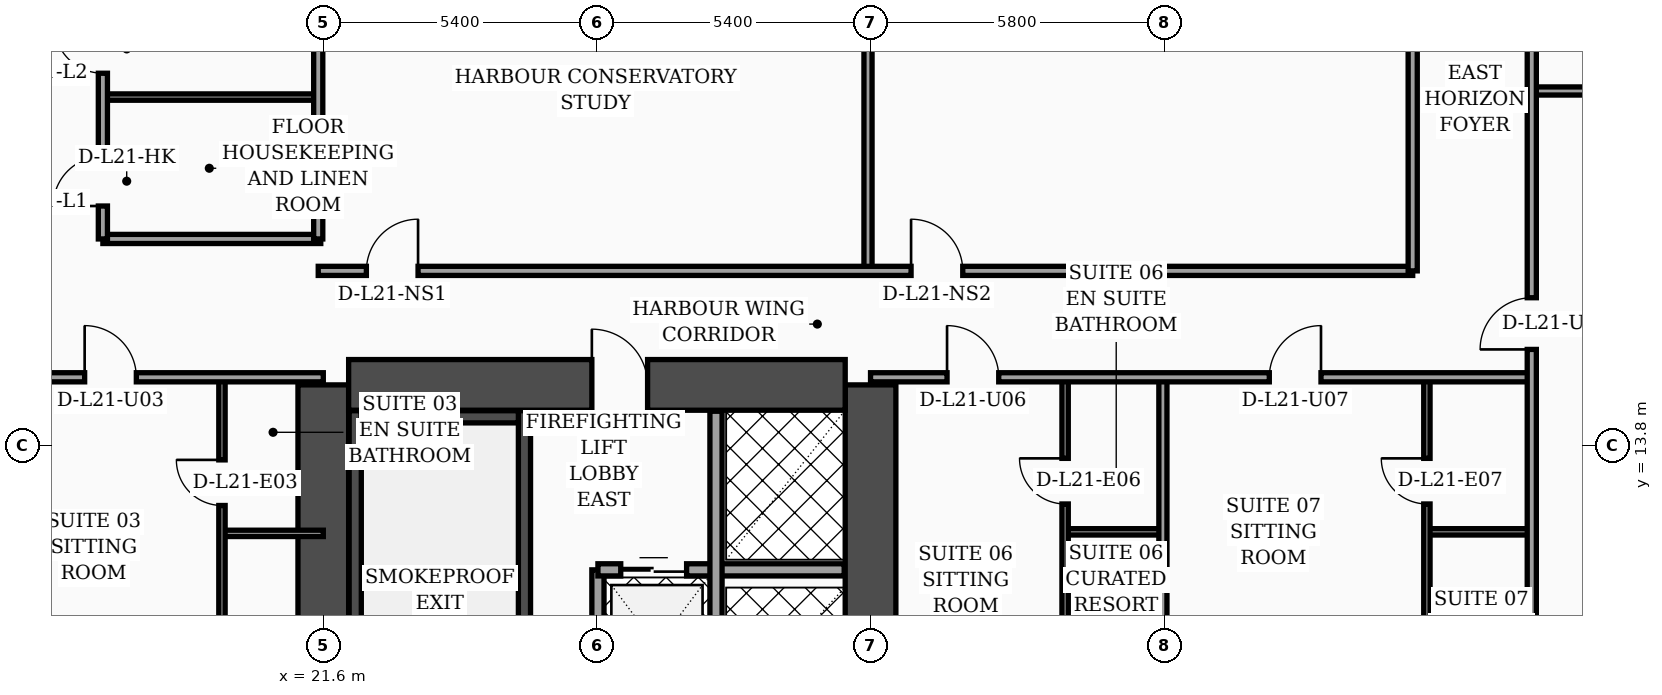
"""IFC4 building model, lengths in metres.
Left out: names, types, materials, properties, quantities, classifications, styles, units other than length and angle.
Written with IfcOpenShell. Run it as: python <this file> out.ifc"""

import sys

from ifc_helpers import new_model, si_unit, direction, frame, frame_2d, origin, place, context, subcontext, project, spatial, rectangle, extrude, element, fill, save


model = new_model("IFC4")
c1 = context("Model", 3, precision=1e-05, world=origin(), true_north=direction((0.0, 1.0)))
c2 = subcontext(c1, "Body", "Model", "MODEL_VIEW")
j1 = project(units=[si_unit("LENGTHUNIT", "METRE"), si_unit("PLANEANGLEUNIT", "RADIAN")], contexts=[c1])
p1 = place(None, origin())
s1 = spatial("IfcSite", under=j1, at=p1, CompositionType="ELEMENT")
p2 = place(p1, origin())
s2 = spatial("IfcBuilding", under=s1, at=p2, CompositionType="ELEMENT")
p3 = place(p2, frame((0.0, 0.0, 88.8)))
s3 = spatial("IfcBuildingStorey", under=s2, at=p3, CompositionType="ELEMENT", Elevation=88.8)
for number, where, z_axis, x_axis in (
    (1, (21.6, 4.6, 0.0), (0.0, 0.0, 1.0), (0.0, 1.0, 0.0)),
    (2, (32.4, 4.6, 0.0), (0.0, 0.0, 1.0), (0.0, 1.0, 0.0)),
):
    element("IfcWall", number, at=place(p3, frame(where, z_axis=z_axis, x_axis=x_axis)), inside=s3, PredefinedType="SHEAR", context=c2, shape_type="SweptSolid", body=[
        extrude(rectangle(XDim=10.4, YDim=1.0, at=frame_2d((5.2, 0.0))), origin(), (0.0, 0.0, 1.0), 3.52),
    ])
p4 = place(p3, frame((22.1, 15.0, 0.0), z_axis=(0.0, 0.0, 1.0), x_axis=(1.0, 0.0, 0.0)))
e3 = element("IfcWall", 3, at=p4, inside=s3, PredefinedType="SHEAR", context=c2, shape_type="SweptSolid", body=[
    extrude(rectangle(XDim=9.8, YDim=1.0, at=frame_2d((4.9, 0.0))), origin(), (0.0, 0.0, 1.0), 3.52),
])
p5 = place(p4, frame((4.8, 0.0, 0.0)))
e4 = element("IfcOpeningElement", 4, at=p5, cuts=e3, PredefinedType="OPENING", context=c2, shape_type="SweptSolid", body=[
    extrude(rectangle(XDim=1.1, YDim=2.2, at=frame_2d((0.55, 1.1))), frame((0.0, 0.51, 0.0), z_axis=(0.0, -1.0, 0.0), x_axis=(1.0, 0.0, 0.0)), (0.0, 0.0, 1.0), 1.02),
])
p6 = place(p3, frame((22.23, 5.1, 0.0), z_axis=(0.0, 0.0, 1.0), x_axis=(0.0, 1.0, 0.0)))
e5 = element("IfcWall", 5, at=p6, inside=s3, PredefinedType="SOLIDWALL", context=c2, shape_type="SweptSolid", body=[
    extrude(rectangle(XDim=9.39, YDim=0.24, at=frame_2d((4.695, 0.0))), origin(), (0.0, 0.0, 1.0), 3.52),
])
p7 = place(p3, frame((25.57, 5.1, 0.0), z_axis=(0.0, 0.0, 1.0), x_axis=(0.0, 1.0, 0.0)))
e6 = element("IfcWall", 6, at=p7, inside=s3, PredefinedType="SOLIDWALL", context=c2, shape_type="SweptSolid", body=[
    extrude(rectangle(XDim=9.39, YDim=0.24, at=frame_2d((4.695, 0.0))), origin(), (0.0, 0.0, 1.0), 3.52),
])
p8 = place(p7, frame((0.35, 0.0, 0.0)))
e7 = element("IfcOpeningElement", 7, at=p8, cuts=e6, PredefinedType="OPENING", context=c2, shape_type="SweptSolid", body=[
    extrude(rectangle(XDim=1.15, YDim=2.2, at=frame_2d((0.575, 1.1))), frame((0.0, 0.13, 0.0), z_axis=(0.0, -1.0, 0.0), x_axis=(1.0, 0.0, 0.0)), (0.0, 0.0, 1.0), 0.26),
])
p9 = place(p3, frame((22.35, 14.37, 0.0), z_axis=(0.0, 0.0, 1.0), x_axis=(1.0, 0.0, 0.0)))
e8 = element("IfcWall", 8, at=p9, inside=s3, PredefinedType="SOLIDWALL", context=c2, shape_type="SweptSolid", body=[
    extrude(rectangle(XDim=3.1, YDim=0.24, at=frame_2d((1.55, 0.0))), origin(), (0.0, 0.0, 1.0), 3.52),
])
p10 = place(p3, frame((27.02, 5.12, 0.0), z_axis=(0.0, 0.0, 1.0), x_axis=(0.0, 1.0, 0.0)))
e9 = element("IfcWall", 9, at=p10, inside=s3, PredefinedType="SOLIDWALL", context=c2, shape_type="SweptSolid", body=[
    extrude(rectangle(XDim=6.23, YDim=0.24, at=frame_2d((3.115, 0.0))), origin(), (0.0, 0.0, 1.0), 3.52),
])
p11 = place(p3, frame((27.02, 11.35, 0.0), z_axis=(0.0, 0.0, 1.0), x_axis=(1.0, 0.0, 0.0)))
e10 = element("IfcWall", 10, at=p11, inside=s3, PredefinedType="SOLIDWALL", context=c2, shape_type="SweptSolid", body=[
    extrude(rectangle(XDim=4.86, YDim=0.24, at=frame_2d((2.43, 0.0))), origin(), (0.0, 0.0, 1.0), 3.52),
])
p12 = place(p11, frame((0.45, 0.0, 0.0)))
e11 = element("IfcOpeningElement", 11, at=p12, cuts=e10, PredefinedType="OPENING", context=c2, shape_type="SweptSolid", body=[
    extrude(rectangle(XDim=1.3, YDim=2.35, at=frame_2d((0.65, 1.175))), frame((0.0, 0.13, 0.0), z_axis=(0.0, -1.0, 0.0), x_axis=(1.0, 0.0, 0.0)), (0.0, 0.0, 1.0), 0.26),
])
p13 = place(p3, frame((29.35, 5.12, 0.0), z_axis=(0.0, 0.0, 1.0), x_axis=(0.0, 1.0, 0.0)))
e12 = element("IfcWall", 12, at=p13, inside=s3, PredefinedType="SOLIDWALL", context=c2, shape_type="SweptSolid", body=[
    extrude(rectangle(XDim=9.36, YDim=0.24, at=frame_2d((4.68, 0.0))), origin(), (0.0, 0.0, 1.0), 3.52),
])
p14 = place(p13, frame((0.55, 0.0, 0.0)))
e13 = element("IfcOpeningElement", 13, at=p14, cuts=e12, PredefinedType="OPENING", context=c2, shape_type="SweptSolid", body=[
    extrude(rectangle(XDim=1.3, YDim=2.35, at=frame_2d((0.65, 1.175))), frame((0.0, 0.13, 0.0), z_axis=(0.0, -1.0, 0.0), x_axis=(1.0, 0.0, 0.0)), (0.0, 0.0, 1.0), 0.26),
])
p15 = place(p3, frame((19.6, 12.07, 0.0), z_axis=(0.0, 0.0, 1.0), x_axis=(1.0, 0.0, 0.0)))
e14 = element("IfcWall", 14, at=p15, inside=s3, PredefinedType="PARTITIONING", context=c2, shape_type="SweptSolid", body=[
    extrude(rectangle(XDim=2.0, YDim=0.125, at=frame_2d((1.0, 0.0))), origin(), (0.0, 0.0, 1.0), 3.52),
])
p16 = place(p3, frame((19.6, 2.44, 0.0), z_axis=(0.0, 0.0, 1.0), x_axis=(0.0, 1.0, 0.0)))
e15 = element("IfcWall", 15, at=p16, inside=s3, PredefinedType="PARTITIONING", context=c2, shape_type="SweptSolid", body=[
    extrude(rectangle(XDim=12.71, YDim=0.125, at=frame_2d((6.355, 0.0))), origin(), (0.0, 0.0, 1.0), 2.32),
])
p17 = place(p16, frame((4.34, 0.0, 0.0)))
e16 = element("IfcOpeningElement", 16, at=p17, cuts=e15, PredefinedType="OPENING", context=c2, shape_type="SweptSolid", body=[
    extrude(rectangle(XDim=0.96, YDim=2.2, at=frame_2d((0.48, 1.1))), frame((0.0, 0.073, 0.0), z_axis=(0.0, -1.0, 0.0), x_axis=(1.0, 0.0, 0.0)), (0.0, 0.0, 1.0), 0.145),
])
p18 = place(p16, frame((10.18, 0.0, 0.0)))
e17 = element("IfcOpeningElement", 17, at=p18, cuts=e15, PredefinedType="OPENING", context=c2, shape_type="SweptSolid", body=[
    extrude(rectangle(XDim=0.9, YDim=2.15, at=frame_2d((0.45, 1.075))), frame((0.0, 0.073, 0.0), z_axis=(0.0, -1.0, 0.0), x_axis=(1.0, 0.0, 0.0)), (0.0, 0.0, 1.0), 0.145),
])
p19 = place(p3, frame((15.15, 15.15, 0.0), z_axis=(0.0, 0.0, 1.0), x_axis=(1.0, 0.0, 0.0)))
e18 = element("IfcWall", 18, at=p19, inside=s3, PredefinedType="PARTITIONING", context=c2, shape_type="SweptSolid", body=[
    extrude(rectangle(XDim=6.45, YDim=0.18, at=frame_2d((3.225, 0.0))), origin(), (0.0, 0.0, 1.0), 2.32),
])
p20 = place(p19, frame((1.74, 0.0, 0.0)))
e19 = element("IfcOpeningElement", 19, at=p20, cuts=e18, PredefinedType="OPENING", context=c2, shape_type="SweptSolid", body=[
    extrude(rectangle(XDim=1.02, YDim=2.2, at=frame_2d((0.51, 1.1))), frame((0.0, 0.1, 0.0), z_axis=(0.0, -1.0, 0.0), x_axis=(1.0, 0.0, 0.0)), (0.0, 0.0, 1.0), 0.2),
])
p21 = place(p3, frame((17.25, 17.88, 0.0), z_axis=(0.0, 0.0, 1.0), x_axis=(1.0, 0.0, 0.0)))
e20 = element("IfcWall", 20, at=p21, inside=s3, PredefinedType="PARTITIONING", context=c2, shape_type="SweptSolid", body=[
    extrude(rectangle(XDim=4.3, YDim=0.18, at=frame_2d((2.15, 0.0))), origin(), (0.0, 0.0, 1.0), 3.52),
])
p22 = place(p3, frame((17.25, 20.68, 0.0), z_axis=(0.0, 0.0, 1.0), x_axis=(1.0, 0.0, 0.0)))
e21 = element("IfcWall", 21, at=p22, inside=s3, PredefinedType="PARTITIONING", context=c2, shape_type="SweptSolid", body=[
    extrude(rectangle(XDim=4.3, YDim=0.125, at=frame_2d((2.15, 0.0))), origin(), (0.0, 0.0, 1.0), 3.52),
])
p23 = place(p3, frame((21.5, 17.88, 0.0), z_axis=(0.0, 0.0, 1.0), x_axis=(0.0, 1.0, 0.0)))
e22 = element("IfcWall", 22, at=p23, inside=s3, PredefinedType="PARTITIONING", context=c2, shape_type="SweptSolid", body=[
    extrude(rectangle(XDim=6.44, YDim=0.18, at=frame_2d((3.22, 0.0))), origin(), (0.0, 0.0, 1.0), 3.52),
])
p24 = place(p3, frame((17.25, 17.88, 0.0), z_axis=(0.0, 0.0, 1.0), x_axis=(0.0, 1.0, 0.0)))
e23 = element("IfcWall", 23, at=p24, inside=s3, PredefinedType="PARTITIONING", context=c2, shape_type="SweptSolid", body=[
    extrude(rectangle(XDim=6.44, YDim=0.18, at=frame_2d((3.22, 0.0))), origin(), (0.0, 0.0, 1.0), 3.52),
])
p25 = place(p24, frame((0.65, 0.0, 0.0)))
e24 = element("IfcOpeningElement", 24, at=p25, cuts=e23, PredefinedType="OPENING", context=c2, shape_type="SweptSolid", body=[
    extrude(rectangle(XDim=0.98, YDim=2.15, at=frame_2d((0.49, 1.075))), frame((0.0, 0.1, 0.0), z_axis=(0.0, -1.0, 0.0), x_axis=(1.0, 0.0, 0.0)), (0.0, 0.0, 1.0), 0.2),
])
p26 = place(p24, frame((3.27, 0.0, 0.0)))
e25 = element("IfcOpeningElement", 25, at=p26, cuts=e23, PredefinedType="OPENING", context=c2, shape_type="SweptSolid", body=[
    extrude(rectangle(XDim=0.96, YDim=2.2, at=frame_2d((0.48, 1.1))), frame((0.0, 0.1, 0.0), z_axis=(0.0, -1.0, 0.0), x_axis=(1.0, 0.0, 0.0)), (0.0, 0.0, 1.0), 0.2),
])
p27 = place(p3, frame((36.24, 12.1, 0.0), z_axis=(0.0, 0.0, 1.0), x_axis=(1.0, 0.0, 0.0)))
e26 = element("IfcWall", 26, at=p27, inside=s3, PredefinedType="PARTITIONING", context=c2, shape_type="SweptSolid", body=[
    extrude(rectangle(XDim=1.93, YDim=0.125, at=frame_2d((0.965, 0.0))), origin(), (0.0, 0.0, 1.0), 3.52),
])
p28 = place(p3, frame((36.24, 2.44, 0.0), z_axis=(0.0, 0.0, 1.0), x_axis=(0.0, 1.0, 0.0)))
e27 = element("IfcWall", 27, at=p28, inside=s3, PredefinedType="PARTITIONING", context=c2, shape_type="SweptSolid", body=[
    extrude(rectangle(XDim=12.71, YDim=0.125, at=frame_2d((6.355, 0.0))), origin(), (0.0, 0.0, 1.0), 2.82),
])
p29 = place(p28, frame((4.35, 0.0, 0.0)))
e28 = element("IfcOpeningElement", 28, at=p29, cuts=e27, PredefinedType="OPENING", context=c2, shape_type="SweptSolid", body=[
    extrude(rectangle(XDim=0.96, YDim=2.2, at=frame_2d((0.48, 1.1))), frame((0.0, 0.073, 0.0), z_axis=(0.0, -1.0, 0.0), x_axis=(1.0, 0.0, 0.0)), (0.0, 0.0, 1.0), 0.145),
])
p30 = place(p28, frame((10.21, 0.0, 0.0)))
e29 = element("IfcOpeningElement", 29, at=p30, cuts=e27, PredefinedType="OPENING", context=c2, shape_type="SweptSolid", body=[
    extrude(rectangle(XDim=0.9, YDim=2.15, at=frame_2d((0.45, 1.075))), frame((0.0, 0.073, 0.0), z_axis=(0.0, -1.0, 0.0), x_axis=(1.0, 0.0, 0.0)), (0.0, 0.0, 1.0), 0.145),
])
p31 = place(p3, frame((43.38, 12.1, 0.0), z_axis=(0.0, 0.0, 1.0), x_axis=(1.0, 0.0, 0.0)))
e30 = element("IfcWall", 30, at=p31, inside=s3, PredefinedType="PARTITIONING", context=c2, shape_type="SweptSolid", body=[
    extrude(rectangle(XDim=2.07, YDim=0.125, at=frame_2d((1.035, 0.0))), origin(), (0.0, 0.0, 1.0), 3.52),
])
p32 = place(p3, frame((43.38, 2.44, 0.0), z_axis=(0.0, 0.0, 1.0), x_axis=(0.0, 1.0, 0.0)))
e31 = element("IfcWall", 31, at=p32, inside=s3, PredefinedType="PARTITIONING", context=c2, shape_type="SweptSolid", body=[
    extrude(rectangle(XDim=12.71, YDim=0.125, at=frame_2d((6.355, 0.0))), origin(), (0.0, 0.0, 1.0), 3.02),
])
p33 = place(p32, frame((4.35, 0.0, 0.0)))
e32 = element("IfcOpeningElement", 32, at=p33, cuts=e31, PredefinedType="OPENING", context=c2, shape_type="SweptSolid", body=[
    extrude(rectangle(XDim=0.96, YDim=2.2, at=frame_2d((0.48, 1.1))), frame((0.0, 0.073, 0.0), z_axis=(0.0, -1.0, 0.0), x_axis=(1.0, 0.0, 0.0)), (0.0, 0.0, 1.0), 0.145),
])
p34 = place(p32, frame((10.21, 0.0, 0.0)))
e33 = element("IfcOpeningElement", 33, at=p34, cuts=e31, PredefinedType="OPENING", context=c2, shape_type="SweptSolid", body=[
    extrude(rectangle(XDim=0.9, YDim=2.15, at=frame_2d((0.45, 1.075))), frame((0.0, 0.073, 0.0), z_axis=(0.0, -1.0, 0.0), x_axis=(1.0, 0.0, 0.0)), (0.0, 0.0, 1.0), 0.145),
])
p35 = place(p3, frame((38.17, 2.44, 0.0), z_axis=(0.0, 0.0, 1.0), x_axis=(0.0, 1.0, 0.0)))
e34 = element("IfcWall", 34, at=p35, inside=s3, PredefinedType="PARTITIONING", context=c2, shape_type="SweptSolid", body=[
    extrude(rectangle(XDim=12.71, YDim=0.16, at=frame_2d((6.355, 0.0))), origin(), (0.0, 0.0, 1.0), 2.82),
])
p36 = place(p3, frame((32.4, 15.15, 0.0), z_axis=(0.0, 0.0, 1.0), x_axis=(1.0, 0.0, 0.0)))
e35 = element("IfcWall", 35, at=p36, inside=s3, PredefinedType="PARTITIONING", context=c2, shape_type="SweptSolid", body=[
    extrude(rectangle(XDim=13.05, YDim=0.18, at=frame_2d((6.525, 0.0))), origin(), (0.0, 0.0, 1.0), 2.82),
])
p37 = place(p36, frame((1.51, 0.0, 0.0)))
e36 = element("IfcOpeningElement", 36, at=p37, cuts=e35, PredefinedType="OPENING", context=c2, shape_type="SweptSolid", body=[
    extrude(rectangle(XDim=1.02, YDim=2.2, at=frame_2d((0.51, 1.1))), frame((0.0, 0.1, 0.0), z_axis=(0.0, -1.0, 0.0), x_axis=(1.0, 0.0, 0.0)), (0.0, 0.0, 1.0), 0.2),
])
p38 = place(p36, frame((7.87, 0.0, 0.0)))
e37 = element("IfcOpeningElement", 37, at=p38, cuts=e35, PredefinedType="OPENING", context=c2, shape_type="SweptSolid", body=[
    extrude(rectangle(XDim=1.02, YDim=2.2, at=frame_2d((0.51, 1.1))), frame((0.0, 0.1, 0.0), z_axis=(0.0, -1.0, 0.0), x_axis=(1.0, 0.0, 0.0)), (0.0, 0.0, 1.0), 0.2),
])
p39 = place(p3, frame((32.35, 17.25, 0.0), z_axis=(0.0, 0.0, 1.0), x_axis=(0.0, 1.0, 0.0)))
e38 = element("IfcWall", 38, at=p39, inside=s3, PredefinedType="PARTITIONING", context=c2, shape_type="SweptSolid", body=[
    extrude(rectangle(XDim=12.31, YDim=0.16, at=frame_2d((6.155, 0.0))), origin(), (0.0, 0.0, 1.0), 2.82),
])
p40 = place(p3, frame((21.5, 17.25, 0.0), z_axis=(0.0, 0.0, 1.0), x_axis=(1.0, 0.0, 0.0)))
e39 = element("IfcWall", 39, at=p40, inside=s3, PredefinedType="PARTITIONING", context=c2, shape_type="SweptSolid", body=[
    extrude(rectangle(XDim=21.6, YDim=0.18, at=frame_2d((10.8, 0.0))), origin(), (0.0, 0.0, 1.0), 2.82),
])
p41 = place(p40, frame((0.95, 0.0, 0.0)))
e40 = element("IfcOpeningElement", 40, at=p41, cuts=e39, PredefinedType="OPENING", context=c2, shape_type="SweptSolid", body=[
    extrude(rectangle(XDim=1.02, YDim=2.2, at=frame_2d((0.51, 1.1))), frame((0.0, 0.1, 0.0), z_axis=(0.0, -1.0, 0.0), x_axis=(1.0, 0.0, 0.0)), (0.0, 0.0, 1.0), 0.2),
])
p42 = place(p40, frame((11.7, 0.0, 0.0)))
e41 = element("IfcOpeningElement", 41, at=p42, cuts=e39, PredefinedType="OPENING", context=c2, shape_type="SweptSolid", body=[
    extrude(rectangle(XDim=1.02, YDim=2.2, at=frame_2d((0.51, 1.1))), frame((0.0, 0.1, 0.0), z_axis=(0.0, -1.0, 0.0), x_axis=(1.0, 0.0, 0.0)), (0.0, 0.0, 1.0), 0.2),
])
p43 = place(p3, frame((43.1, 17.25, 0.0), z_axis=(0.0, 0.0, 1.0), x_axis=(0.0, 1.0, 0.0)))
e42 = element("IfcWall", 42, at=p43, inside=s3, PredefinedType="PARTITIONING", context=c2, shape_type="SweptSolid", body=[
    extrude(rectangle(XDim=17.38, YDim=0.18, at=frame_2d((8.69, 0.0))), origin(), (0.0, 0.0, 1.0), 2.82),
])
p44 = place(p3, frame((45.45, 20.8, 0.0), z_axis=(0.0, 0.0, 1.0), x_axis=(1.0, 0.0, 0.0)))
e43 = element("IfcWall", 43, at=p44, inside=s3, PredefinedType="PARTITIONING", context=c2, shape_type="SweptSolid", body=[
    extrude(rectangle(XDim=13.3, YDim=0.16, at=frame_2d((6.65, 0.0))), origin(), (0.0, 0.0, 1.0), 2.82),
])
p45 = place(p3, frame((45.45, 2.44, 0.0), z_axis=(0.0, 0.0, 1.0), x_axis=(0.0, 1.0, 0.0)))
e44 = element("IfcWall", 44, at=p45, inside=s3, PredefinedType="PARTITIONING", context=c2, shape_type="SweptSolid", body=[
    extrude(rectangle(XDim=27.84, YDim=0.18, at=frame_2d((13.92, 0.0))), origin(), (0.0, 0.0, 1.0), 2.82),
])
p46 = place(p45, frame((13.26, 0.0, 0.0)))
e45 = element("IfcOpeningElement", 45, at=p46, cuts=e44, PredefinedType="OPENING", context=c2, shape_type="SweptSolid", body=[
    extrude(rectangle(XDim=1.02, YDim=2.2, at=frame_2d((0.51, 1.1))), frame((0.0, 0.1, 0.0), z_axis=(0.0, -1.0, 0.0), x_axis=(1.0, 0.0, 0.0)), (0.0, 0.0, 1.0), 0.2),
])
p47 = place(p45, frame((21.52, 0.0, 0.0)))
e46 = element("IfcOpeningElement", 46, at=p47, cuts=e44, PredefinedType="OPENING", context=c2, shape_type="SweptSolid", body=[
    extrude(rectangle(XDim=1.02, YDim=2.2, at=frame_2d((0.51, 1.1))), frame((0.0, 0.1, 0.0), z_axis=(0.0, -1.0, 0.0), x_axis=(1.0, 0.0, 0.0)), (0.0, 0.0, 1.0), 0.2),
])
p48 = place(p12, origin())
e47 = element("IfcDoor", 47, at=p48, inside=s3, OperationType="DOUBLE_DOOR_SLIDING", PredefinedType="DOOR", context=c2, shape_type="SweptSolid", body=[
    extrude(rectangle(XDim=1.3, YDim=2.35, at=frame_2d((0.65, 1.175))), frame((0.0, 0.025, 0.0), z_axis=(0.0, -1.0, 0.0), x_axis=(1.0, 0.0, 0.0)), (0.0, 0.0, 1.0), 0.05),
])
fill(e11, e47)
p49 = place(p18, origin())
e48 = element("IfcDoor", 48, at=p49, inside=s3, OperationType="SINGLE_SWING_RIGHT", PredefinedType="DOOR", context=c2, shape_type="SweptSolid", body=[
    extrude(rectangle(XDim=0.9, YDim=2.15, at=frame_2d((0.45, 1.075))), frame((0.0, 0.025, 0.0), z_axis=(0.0, -1.0, 0.0), x_axis=(1.0, 0.0, 0.0)), (0.0, 0.0, 1.0), 0.05),
])
fill(e17, e48)
p50 = place(p20, origin())
e49 = element("IfcDoor", 49, at=p50, inside=s3, OperationType="SINGLE_SWING_LEFT", PredefinedType="DOOR", context=c2, shape_type="SweptSolid", body=[
    extrude(rectangle(XDim=1.02, YDim=2.2, at=frame_2d((0.51, 1.1))), frame((0.0, 0.025, 0.0), z_axis=(0.0, -1.0, 0.0), x_axis=(1.0, 0.0, 0.0)), (0.0, 0.0, 1.0), 0.05),
])
fill(e19, e49)
p51 = place(p25, origin())
e50 = element("IfcDoor", 50, at=p51, inside=s3, OperationType="SINGLE_SWING_LEFT", PredefinedType="DOOR", context=c2, shape_type="SweptSolid", body=[
    extrude(rectangle(XDim=0.98, YDim=2.15, at=frame_2d((0.49, 1.075))), frame((0.0, 0.025, 0.0), z_axis=(0.0, -1.0, 0.0), x_axis=(1.0, 0.0, 0.0)), (0.0, 0.0, 1.0), 0.05),
])
fill(e24, e50)
p52 = place(p26, origin())
e51 = element("IfcDoor", 51, at=p52, inside=s3, OperationType="SINGLE_SWING_RIGHT", PredefinedType="DOOR", context=c2, shape_type="SweptSolid", body=[
    extrude(rectangle(XDim=0.96, YDim=2.2, at=frame_2d((0.48, 1.1))), frame((0.0, 0.025, 0.0), z_axis=(0.0, -1.0, 0.0), x_axis=(1.0, 0.0, 0.0)), (0.0, 0.0, 1.0), 0.05),
])
fill(e25, e51)
p53 = place(p30, origin())
e52 = element("IfcDoor", 52, at=p53, inside=s3, OperationType="SINGLE_SWING_RIGHT", PredefinedType="DOOR", context=c2, shape_type="SweptSolid", body=[
    extrude(rectangle(XDim=0.9, YDim=2.15, at=frame_2d((0.45, 1.075))), frame((0.0, 0.025, 0.0), z_axis=(0.0, -1.0, 0.0), x_axis=(1.0, 0.0, 0.0)), (0.0, 0.0, 1.0), 0.05),
])
fill(e29, e52)
p54 = place(p34, origin())
e53 = element("IfcDoor", 53, at=p54, inside=s3, OperationType="SINGLE_SWING_RIGHT", PredefinedType="DOOR", context=c2, shape_type="SweptSolid", body=[
    extrude(rectangle(XDim=0.9, YDim=2.15, at=frame_2d((0.45, 1.075))), frame((0.0, 0.025, 0.0), z_axis=(0.0, -1.0, 0.0), x_axis=(1.0, 0.0, 0.0)), (0.0, 0.0, 1.0), 0.05),
])
fill(e33, e53)
p55 = place(p37, origin())
e54 = element("IfcDoor", 54, at=p55, inside=s3, OperationType="SINGLE_SWING_LEFT", PredefinedType="DOOR", context=c2, shape_type="SweptSolid", body=[
    extrude(rectangle(XDim=1.02, YDim=2.2, at=frame_2d((0.51, 1.1))), frame((0.0, 0.025, 0.0), z_axis=(0.0, -1.0, 0.0), x_axis=(1.0, 0.0, 0.0)), (0.0, 0.0, 1.0), 0.05),
])
fill(e36, e54)
p56 = place(p38, origin())
e55 = element("IfcDoor", 55, at=p56, inside=s3, OperationType="SINGLE_SWING_RIGHT", PredefinedType="DOOR", context=c2, shape_type="SweptSolid", body=[
    extrude(rectangle(XDim=1.02, YDim=2.2, at=frame_2d((0.51, 1.1))), frame((0.0, 0.025, 0.0), z_axis=(0.0, -1.0, 0.0), x_axis=(1.0, 0.0, 0.0)), (0.0, 0.0, 1.0), 0.05),
])
fill(e37, e55)
p57 = place(p41, origin())
e56 = element("IfcDoor", 56, at=p57, inside=s3, OperationType="SINGLE_SWING_RIGHT", PredefinedType="DOOR", context=c2, shape_type="SweptSolid", body=[
    extrude(rectangle(XDim=1.02, YDim=2.2, at=frame_2d((0.51, 1.1))), frame((0.0, 0.025, 0.0), z_axis=(0.0, -1.0, 0.0), x_axis=(1.0, 0.0, 0.0)), (0.0, 0.0, 1.0), 0.05),
])
fill(e40, e56)
p58 = place(p42, origin())
e57 = element("IfcDoor", 57, at=p58, inside=s3, OperationType="SINGLE_SWING_LEFT", PredefinedType="DOOR", context=c2, shape_type="SweptSolid", body=[
    extrude(rectangle(XDim=1.02, YDim=2.2, at=frame_2d((0.51, 1.1))), frame((0.0, 0.025, 0.0), z_axis=(0.0, -1.0, 0.0), x_axis=(1.0, 0.0, 0.0)), (0.0, 0.0, 1.0), 0.05),
])
fill(e41, e57)
p59 = place(p46, origin())
e58 = element("IfcDoor", 58, at=p59, inside=s3, OperationType="SINGLE_SWING_LEFT", PredefinedType="DOOR", context=c2, shape_type="SweptSolid", body=[
    extrude(rectangle(XDim=1.02, YDim=2.2, at=frame_2d((0.51, 1.1))), frame((0.0, 0.025, 0.0), z_axis=(0.0, -1.0, 0.0), x_axis=(1.0, 0.0, 0.0)), (0.0, 0.0, 1.0), 0.05),
])
fill(e45, e58)
p60 = place(p5, origin())
e59 = element("IfcDoor", 59, at=p60, inside=s3, OperationType="SINGLE_SWING_LEFT", PredefinedType="DOOR", context=c2, shape_type="SweptSolid", body=[
    extrude(rectangle(XDim=1.1, YDim=2.2, at=frame_2d((0.55, 1.1))), frame((0.0, 0.025, 0.0), z_axis=(0.0, -1.0, 0.0), x_axis=(1.0, 0.0, 0.0)), (0.0, 0.0, 1.0), 0.05),
])
fill(e4, e59)
save(model, sys.argv[1])
